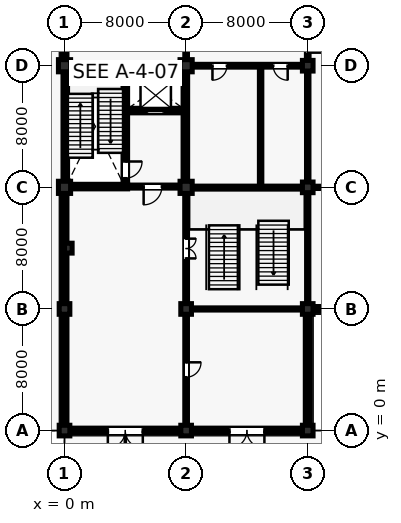
"""IFC4 building model, lengths in metres.
Left out: names, types, materials, properties, quantities, classifications, styles, units other than length and angle.
Written with IfcOpenShell. Run it as: python <this file> out.ifc"""

import sys

from ifc_helpers import new_model, si_unit, direction, frame, frame_2d, origin, origin_2d, place, context, subcontext, project, spatial, rectangle, extrude, element, fill, save


model = new_model("IFC4")
c1 = context("Model", 3, precision=1e-05, world=origin(), true_north=direction((0.0, 1.0)))
c2 = subcontext(c1, "Body", "Model", "MODEL_VIEW")
j1 = project(units=[si_unit("LENGTHUNIT", "METRE"), si_unit("PLANEANGLEUNIT", "RADIAN")], contexts=[c1])
p1 = place(None, origin())
s1 = spatial("IfcSite", under=j1, at=p1, CompositionType="ELEMENT")
p2 = place(p1, origin())
s2 = spatial("IfcBuilding", under=s1, at=p2, CompositionType="ELEMENT")
p3 = place(p2, origin())
s3 = spatial("IfcBuildingStorey", under=s2, at=p3, CompositionType="ELEMENT", Elevation=0.0)
for number, where, z_axis, x_axis in (
    (1, (0.0, 0.0, 0.0), (0.0, 0.0, 1.0), (1.0, 0.0, 0.0)),
    (2, (0.0, 8.0, 0.0), (0.0, 0.0, 1.0), (1.0, 0.0, 0.0)),
):
    element("IfcColumn", number, at=place(p3, frame(where, z_axis=z_axis, x_axis=x_axis)), inside=s3, PredefinedType="COLUMN", context=c2, shape_type="SweptSolid", body=[
        extrude(rectangle(XDim=0.7, YDim=0.7, at=origin_2d()), origin(), (0.0, 0.0, 1.0), 5.28),
    ])
for number, where, z_axis, x_axis in (
    (3, (0.0, 16.0, 0.0), (0.0, 0.0, 1.0), (1.0, 0.0, 0.0)),
    (4, (0.0, 24.0, 0.0), (0.0, 0.0, 1.0), (1.0, 0.0, 0.0)),
):
    element("IfcColumn", number, at=place(p3, frame(where, z_axis=z_axis, x_axis=x_axis)), inside=s3, PredefinedType="COLUMN", context=c2, shape_type="SweptSolid", body=[
        extrude(rectangle(XDim=0.8, YDim=0.8, at=origin_2d()), origin(), (0.0, 0.0, 1.0), 5.28),
    ])
for number, where, z_axis, x_axis in (
    (5, (8.0, 0.0, 0.0), (0.0, 0.0, 1.0), (1.0, 0.0, 0.0)),
    (6, (8.0, 8.0, 0.0), (0.0, 0.0, 1.0), (1.0, 0.0, 0.0)),
):
    element("IfcColumn", number, at=place(p3, frame(where, z_axis=z_axis, x_axis=x_axis)), inside=s3, PredefinedType="COLUMN", context=c2, shape_type="SweptSolid", body=[
        extrude(rectangle(XDim=0.7, YDim=0.7, at=origin_2d()), origin(), (0.0, 0.0, 1.0), 5.28),
    ])
for number, where, z_axis, x_axis in (
    (7, (8.0, 16.0, 0.0), (0.0, 0.0, 1.0), (1.0, 0.0, 0.0)),
    (8, (8.0, 24.0, 0.0), (0.0, 0.0, 1.0), (1.0, 0.0, 0.0)),
):
    element("IfcColumn", number, at=place(p3, frame(where, z_axis=z_axis, x_axis=x_axis)), inside=s3, PredefinedType="COLUMN", context=c2, shape_type="SweptSolid", body=[
        extrude(rectangle(XDim=0.8, YDim=0.8, at=origin_2d()), origin(), (0.0, 0.0, 1.0), 5.28),
    ])
for number, where, z_axis, x_axis in (
    (9, (16.0, 0.0, 0.0), (0.0, 0.0, 1.0), (1.0, 0.0, 0.0)),
    (10, (16.0, 8.0, 0.0), (0.0, 0.0, 1.0), (1.0, 0.0, 0.0)),
    (11, (16.0, 16.0, 0.0), (0.0, 0.0, 1.0), (1.0, 0.0, 0.0)),
    (12, (16.0, 24.0, 0.0), (0.0, 0.0, 1.0), (1.0, 0.0, 0.0)),
):
    element("IfcColumn", number, at=place(p3, frame(where, z_axis=z_axis, x_axis=x_axis)), inside=s3, PredefinedType="COLUMN", context=c2, shape_type="SweptSolid", body=[
        extrude(rectangle(XDim=0.7, YDim=0.7, at=origin_2d()), origin(), (0.0, 0.0, 1.0), 5.28),
    ])
p4 = place(p3, frame((0.25, 12.0, 0.0), z_axis=(0.0, 0.0, 1.0), x_axis=(1.0, 0.0, 0.0)))
e13 = element("IfcColumn", 13, at=p4, inside=s3, PredefinedType="PILASTER", context=c2, shape_type="SweptSolid", body=[
    extrude(rectangle(XDim=0.5, YDim=0.65, at=origin_2d()), origin(), (0.0, 0.0, 1.0), 5.28),
])
p5 = place(p3, frame((0.335, 0.0, 0.0), z_axis=(0.0, 0.0, 1.0), x_axis=(1.0, 0.0, 0.0)))
e14 = element("IfcWall", 14, at=p5, inside=s3, PredefinedType="SOLIDWALL", context=c2, shape_type="SweptSolid", body=[
    extrude(rectangle(XDim=7.33, YDim=0.32, at=frame_2d((3.665, 0.0))), origin(), (0.0, 0.0, 1.0), 4.61),
])
p6 = place(p5, frame((2.515, 0.0, 0.0)))
e15 = element("IfcOpeningElement", 15, at=p6, cuts=e14, PredefinedType="OPENING", context=c2, shape_type="SweptSolid", body=[
    extrude(rectangle(XDim=2.3, YDim=2.55, at=frame_2d((1.15, 1.275))), frame((0.0, 0.17, 0.0), z_axis=(0.0, -1.0, 0.0), x_axis=(1.0, 0.0, 0.0)), (0.0, 0.0, 1.0), 0.34),
])
p7 = place(p3, frame((0.0, 0.335, 0.0), z_axis=(0.0, 0.0, 1.0), x_axis=(0.0, 1.0, 0.0)))
e16 = element("IfcWall", 16, at=p7, inside=s3, PredefinedType="SOLIDWALL", context=c2, shape_type="SweptSolid", body=[
    extrude(rectangle(XDim=7.33, YDim=0.32, at=frame_2d((3.665, 0.0))), origin(), (0.0, 0.0, 1.0), 4.61),
])
p8 = place(p7, frame((2.465, 0.0, 0.9)))
e17 = element("IfcOpeningElement", 17, at=p8, cuts=e16, PredefinedType="OPENING", context=c2, shape_type="SweptSolid", body=[
    extrude(rectangle(XDim=2.4, YDim=2.8, at=frame_2d((1.2, 1.4))), frame((0.0, 0.17, 0.0), z_axis=(0.0, -1.0, 0.0), x_axis=(1.0, 0.0, 0.0)), (0.0, 0.0, 1.0), 0.34),
])
p9 = place(p3, frame((0.0, 8.335, 0.0), z_axis=(0.0, 0.0, 1.0), x_axis=(0.0, 1.0, 0.0)))
e18 = element("IfcWall", 18, at=p9, inside=s3, PredefinedType="SOLIDWALL", context=c2, shape_type="SweptSolid", body=[
    extrude(rectangle(XDim=7.28, YDim=0.32, at=frame_2d((3.64, 0.0))), origin(), (0.0, 0.0, 1.0), 4.674),
])
p10 = place(p9, frame((4.25, 0.0, 0.9)))
e19 = element("IfcOpeningElement", 19, at=p10, cuts=e18, PredefinedType="OPENING", context=c2, shape_type="SweptSolid", body=[
    extrude(rectangle(XDim=2.15, YDim=2.8, at=frame_2d((1.075, 1.4))), frame((0.0, 0.17, 0.0), z_axis=(0.0, -1.0, 0.0), x_axis=(1.0, 0.0, 0.0)), (0.0, 0.0, 1.0), 0.34),
])
p11 = place(p3, frame((0.0, 24.385, 0.0), z_axis=(0.0, 0.0, 1.0), x_axis=(0.0, 1.0, 0.0)))
e20 = element("IfcWall", 20, at=p11, inside=s3, PredefinedType="SOLIDWALL", context=c2, shape_type="SweptSolid", body=[
    extrude(rectangle(XDim=7.28, YDim=0.32, at=frame_2d((3.64, 0.0))), origin(), (0.0, 0.0, 1.0), 4.677),
])
p12 = place(p11, frame((2.54, 0.0, 0.0)))
e21 = element("IfcOpeningElement", 21, at=p12, cuts=e20, PredefinedType="OPENING", context=c2, shape_type="SweptSolid", body=[
    extrude(rectangle(XDim=2.2, YDim=2.5, at=frame_2d((1.1, 1.25))), frame((0.0, 0.17, 0.0), z_axis=(0.0, -1.0, 0.0), x_axis=(1.0, 0.0, 0.0)), (0.0, 0.0, 1.0), 0.34),
])
p13 = place(p3, frame((8.335, 0.0, 0.0), z_axis=(0.0, 0.0, 1.0), x_axis=(1.0, 0.0, 0.0)))
e22 = element("IfcWall", 22, at=p13, inside=s3, PredefinedType="SOLIDWALL", context=c2, shape_type="SweptSolid", body=[
    extrude(rectangle(XDim=7.33, YDim=0.32, at=frame_2d((3.665, 0.0))), origin(), (0.0, 0.0, 1.0), 4.674),
])
p14 = place(p13, frame((2.515, 0.0, 0.0)))
e23 = element("IfcOpeningElement", 23, at=p14, cuts=e22, PredefinedType="OPENING", context=c2, shape_type="SweptSolid", body=[
    extrude(rectangle(XDim=2.3, YDim=2.55, at=frame_2d((1.15, 1.275))), frame((0.0, 0.17, 0.0), z_axis=(0.0, -1.0, 0.0), x_axis=(1.0, 0.0, 0.0)), (0.0, 0.0, 1.0), 0.34),
])
p15 = place(p3, frame((16.0, 0.335, 0.0), z_axis=(0.0, 0.0, 1.0), x_axis=(0.0, 1.0, 0.0)))
e24 = element("IfcWall", 24, at=p15, inside=s3, PredefinedType="SOLIDWALL", context=c2, shape_type="SweptSolid", body=[
    extrude(rectangle(XDim=7.33, YDim=0.32, at=frame_2d((3.665, 0.0))), origin(), (0.0, 0.0, 1.0), 4.614),
])
p16 = place(p15, frame((2.59, 0.0, 0.9)))
e25 = element("IfcOpeningElement", 25, at=p16, cuts=e24, PredefinedType="OPENING", context=c2, shape_type="SweptSolid", body=[
    extrude(rectangle(XDim=2.15, YDim=2.8, at=frame_2d((1.075, 1.4))), frame((0.0, 0.17, 0.0), z_axis=(0.0, -1.0, 0.0), x_axis=(1.0, 0.0, 0.0)), (0.0, 0.0, 1.0), 0.34),
])
p17 = place(p3, frame((16.335, 8.0, 0.0), z_axis=(0.0, 0.0, 1.0), x_axis=(1.0, 0.0, 0.0)))
e26 = element("IfcWall", 26, at=p17, inside=s3, PredefinedType="SOLIDWALL", context=c2, shape_type="SweptSolid", body=[
    extrude(rectangle(XDim=7.33, YDim=0.32, at=frame_2d((3.665, 0.0))), origin(), (0.0, 0.0, 1.0), 4.677),
])
p18 = place(p17, frame((2.515, 0.0, 0.9)))
e27 = element("IfcOpeningElement", 27, at=p18, cuts=e26, PredefinedType="OPENING", context=c2, shape_type="SweptSolid", body=[
    extrude(rectangle(XDim=2.3, YDim=2.55, at=frame_2d((1.15, 1.275))), frame((0.0, 0.17, 0.0), z_axis=(0.0, -1.0, 0.0), x_axis=(1.0, 0.0, 0.0)), (0.0, 0.0, 1.0), 0.34),
])
for number, where, z_axis, x_axis in (
    (28, (0.05, 16.29, 0.0), (0.0, 0.0, 1.0), (0.0, 1.0, 0.0)),
    (29, (0.29, 23.95, 0.0), (0.0, 0.0, 1.0), (1.0, 0.0, 0.0)),
    (30, (7.95, 16.29, 0.0), (0.0, 0.0, 1.0), (0.0, 1.0, 0.0)),
):
    element("IfcWall", number, at=place(p3, frame(where, z_axis=z_axis, x_axis=x_axis)), inside=s3, PredefinedType="SHEAR", context=c2, shape_type="SweptSolid", body=[
        extrude(rectangle(XDim=7.42, YDim=0.3, at=frame_2d((3.71, 0.0))), origin(), (0.0, 0.0, 1.0), 5.035),
    ])
p19 = place(p3, frame((0.29, 16.05, 0.0), z_axis=(0.0, 0.0, 1.0), x_axis=(1.0, 0.0, 0.0)))
e31 = element("IfcWall", 31, at=p19, inside=s3, PredefinedType="SHEAR", context=c2, shape_type="SweptSolid", body=[
    extrude(rectangle(XDim=3.86, YDim=0.3, at=frame_2d((1.93, 0.0))), origin(), (0.0, 0.0, 1.0), 5.035),
])
p20 = place(p3, frame((4.0, 16.05, 0.0), z_axis=(0.0, 0.0, 1.0), x_axis=(0.0, 1.0, 0.0)))
e32 = element("IfcWall", 32, at=p20, inside=s3, PredefinedType="SHEAR", context=c2, shape_type="SweptSolid", body=[
    extrude(rectangle(XDim=7.9, YDim=0.3, at=frame_2d((3.95, 0.0))), origin(), (0.0, 0.0, 1.0), 5.035),
])
p21 = place(p20, frame((0.55, 0.0, 0.0)))
e33 = element("IfcOpeningElement", 33, at=p21, cuts=e32, PredefinedType="OPENING", context=c2, shape_type="SweptSolid", body=[
    extrude(rectangle(XDim=1.1, YDim=2.15, at=frame_2d((0.55, 1.075))), frame((0.0, 0.16, 0.0), z_axis=(0.0, -1.0, 0.0), x_axis=(1.0, 0.0, 0.0)), (0.0, 0.0, 1.0), 0.32),
])
p22 = place(p3, frame((4.0, 21.05, 0.0), z_axis=(0.0, 0.0, 1.0), x_axis=(1.0, 0.0, 0.0)))
e34 = element("IfcWall", 34, at=p22, inside=s3, PredefinedType="SHEAR", context=c2, shape_type="SweptSolid", body=[
    extrude(rectangle(XDim=3.95, YDim=0.3, at=frame_2d((1.975, 0.0))), origin(), (0.0, 0.0, 1.0), 5.035),
])
p23 = place(p22, frame((1.425, 0.0, 0.0)))
e35 = element("IfcOpeningElement", 35, at=p23, cuts=e34, PredefinedType="OPENING", context=c2, shape_type="SweptSolid", body=[
    extrude(rectangle(XDim=1.1, YDim=2.2, at=frame_2d((0.55, 1.1))), frame((0.0, 0.16, 0.0), z_axis=(0.0, -1.0, 0.0), x_axis=(1.0, 0.0, 0.0)), (0.0, 0.0, 1.0), 0.32),
])
p24 = place(p3, frame((4.0, 16.05, 0.0), z_axis=(0.0, 0.0, 1.0), x_axis=(1.0, 0.0, 0.0)))
e36 = element("IfcWall", 36, at=p24, inside=s3, PredefinedType="PARTITIONING", context=c2, shape_type="SweptSolid", body=[
    extrude(rectangle(XDim=3.61, YDim=0.2, at=frame_2d((1.805, 0.0))), origin(), (0.0, 0.0, 1.0), 4.336),
])
p25 = place(p24, frame((1.205, 0.0, 0.0)))
e37 = element("IfcOpeningElement", 37, at=p25, cuts=e36, PredefinedType="OPENING", context=c2, shape_type="SweptSolid", body=[
    extrude(rectangle(XDim=1.2, YDim=2.15, at=frame_2d((0.6, 1.075))), frame((0.0, 0.11, 0.0), z_axis=(0.0, -1.0, 0.0), x_axis=(1.0, 0.0, 0.0)), (0.0, 0.0, 1.0), 0.22),
])
p26 = place(p3, frame((8.0, 0.34, 0.0), z_axis=(0.0, 0.0, 1.0), x_axis=(0.0, 1.0, 0.0)))
e38 = element("IfcWall", 38, at=p26, inside=s3, PredefinedType="PARTITIONING", context=c2, shape_type="SweptSolid", body=[
    extrude(rectangle(XDim=7.32, YDim=0.175, at=frame_2d((3.66, 0.0))), origin(), (0.0, 0.0, 1.0), 4.412),
])
p27 = place(p26, frame((3.17, 0.0, 0.0)))
e39 = element("IfcOpeningElement", 39, at=p27, cuts=e38, PredefinedType="OPENING", context=c2, shape_type="SweptSolid", body=[
    extrude(rectangle(XDim=0.98, YDim=2.15, at=frame_2d((0.49, 1.075))), frame((0.0, 0.097, 0.0), z_axis=(0.0, -1.0, 0.0), x_axis=(1.0, 0.0, 0.0)), (0.0, 0.0, 1.0), 0.195),
])
p28 = place(p3, frame((8.0, 8.34, 0.0), z_axis=(0.0, 0.0, 1.0), x_axis=(0.0, 1.0, 0.0)))
e40 = element("IfcWall", 40, at=p28, inside=s3, PredefinedType="PARTITIONING", context=c2, shape_type="SweptSolid", body=[
    extrude(rectangle(XDim=7.27, YDim=0.185, at=frame_2d((3.635, 0.0))), origin(), (0.0, 0.0, 1.0), 4.404),
])
p29 = place(p28, frame((2.985, 0.0, 0.0)))
e41 = element("IfcOpeningElement", 41, at=p29, cuts=e40, PredefinedType="OPENING", context=c2, shape_type="SweptSolid", body=[
    extrude(rectangle(XDim=1.3, YDim=2.2, at=frame_2d((0.65, 1.1))), frame((0.0, 0.103, 0.0), z_axis=(0.0, -1.0, 0.0), x_axis=(1.0, 0.0, 0.0)), (0.0, 0.0, 1.0), 0.205),
])
p30 = place(p3, frame((8.0, 24.39, 0.0), z_axis=(0.0, 0.0, 1.0), x_axis=(0.0, 1.0, 0.0)))
e42 = element("IfcWall", 42, at=p30, inside=s3, PredefinedType="PARTITIONING", context=c2, shape_type="SweptSolid", body=[
    extrude(rectangle(XDim=7.27, YDim=0.175, at=frame_2d((3.635, 0.0))), origin(), (0.0, 0.0, 1.0), 4.403),
])
p31 = place(p30, frame((3.095, 0.0, 0.0)))
e43 = element("IfcOpeningElement", 43, at=p31, cuts=e42, PredefinedType="OPENING", context=c2, shape_type="SweptSolid", body=[
    extrude(rectangle(XDim=1.08, YDim=2.2, at=frame_2d((0.54, 1.1))), frame((0.0, 0.097, 0.0), z_axis=(0.0, -1.0, 0.0), x_axis=(1.0, 0.0, 0.0)), (0.0, 0.0, 1.0), 0.195),
])
p32 = place(p3, frame((8.34, 8.0, 0.0), z_axis=(0.0, 0.0, 1.0), x_axis=(1.0, 0.0, 0.0)))
e44 = element("IfcWall", 44, at=p32, inside=s3, PredefinedType="PARTITIONING", context=c2, shape_type="SweptSolid", body=[
    extrude(rectangle(XDim=7.32, YDim=0.142, at=frame_2d((3.66, 0.0))), origin(), (0.0, 0.0, 1.0), 4.336),
])
p33 = place(p3, frame((16.0, 8.34, 0.0), z_axis=(0.0, 0.0, 1.0), x_axis=(0.0, 1.0, 0.0)))
e45 = element("IfcWall", 45, at=p33, inside=s3, PredefinedType="PARTITIONING", context=c2, shape_type="SweptSolid", body=[
    extrude(rectangle(XDim=7.32, YDim=0.15, at=frame_2d((3.66, 0.0))), origin(), (0.0, 0.0, 1.0), 4.471),
])
p34 = place(p3, frame((8.39, 16.0, 0.0), z_axis=(0.0, 0.0, 1.0), x_axis=(1.0, 0.0, 0.0)))
e46 = element("IfcWall", 46, at=p34, inside=s3, PredefinedType="PARTITIONING", context=c2, shape_type="SweptSolid", body=[
    extrude(rectangle(XDim=7.27, YDim=0.16, at=frame_2d((3.635, 0.0))), origin(), (0.0, 0.0, 1.0), 4.404),
])
p35 = place(p3, frame((16.0, 16.34, 0.0), z_axis=(0.0, 0.0, 1.0), x_axis=(0.0, 1.0, 0.0)))
e47 = element("IfcWall", 47, at=p35, inside=s3, PredefinedType="PARTITIONING", context=c2, shape_type="SweptSolid", body=[
    extrude(rectangle(XDim=7.32, YDim=0.16, at=frame_2d((3.66, 0.0))), origin(), (0.0, 0.0, 1.0), 4.603),
])
p36 = place(p3, frame((8.39, 24.0, 0.0), z_axis=(0.0, 0.0, 1.0), x_axis=(1.0, 0.0, 0.0)))
e48 = element("IfcWall", 48, at=p36, inside=s3, PredefinedType="PARTITIONING", context=c2, shape_type="SweptSolid", body=[
    extrude(rectangle(XDim=7.27, YDim=0.185, at=frame_2d((3.635, 0.0))), origin(), (0.0, 0.0, 1.0), 4.327),
])
p37 = place(p36, frame((1.343, 0.0, 0.0)))
e49 = element("IfcOpeningElement", 49, at=p37, cuts=e48, PredefinedType="OPENING", context=c2, shape_type="SweptSolid", body=[
    extrude(rectangle(XDim=0.95, YDim=2.1, at=frame_2d((0.475, 1.05))), frame((0.0, 0.103, 0.0), z_axis=(0.0, -1.0, 0.0), x_axis=(1.0, 0.0, 0.0)), (0.0, 0.0, 1.0), 0.205),
])
p38 = place(p36, frame((5.341, 0.0, 0.0)))
e50 = element("IfcOpeningElement", 50, at=p38, cuts=e48, PredefinedType="OPENING", context=c2, shape_type="SweptSolid", body=[
    extrude(rectangle(XDim=0.95, YDim=2.1, at=frame_2d((0.475, 1.05))), frame((0.0, 0.103, 0.0), z_axis=(0.0, -1.0, 0.0), x_axis=(1.0, 0.0, 0.0)), (0.0, 0.0, 1.0), 0.205),
])
p39 = place(p3, frame((16.0, 24.34, 0.0), z_axis=(0.0, 0.0, 1.0), x_axis=(0.0, 1.0, 0.0)))
e51 = element("IfcWall", 51, at=p39, inside=s3, PredefinedType="PARTITIONING", context=c2, shape_type="SweptSolid", body=[
    extrude(rectangle(XDim=7.32, YDim=0.175, at=frame_2d((3.66, 0.0))), origin(), (0.0, 0.0, 1.0), 4.667),
])
p40 = place(p39, frame((0.52, 0.0, 0.0)))
e52 = element("IfcOpeningElement", 52, at=p40, cuts=e51, PredefinedType="OPENING", context=c2, shape_type="SweptSolid", body=[
    extrude(rectangle(XDim=0.94, YDim=2.12, at=frame_2d((0.47, 1.06))), frame((0.0, 0.097, 0.0), z_axis=(0.0, -1.0, 0.0), x_axis=(1.0, 0.0, 0.0)), (0.0, 0.0, 1.0), 0.195),
])
p41 = place(p3, frame((16.34, 16.0, 0.0), z_axis=(0.0, 0.0, 1.0), x_axis=(1.0, 0.0, 0.0)))
e53 = element("IfcWall", 53, at=p41, inside=s3, PredefinedType="PARTITIONING", context=c2, shape_type="SweptSolid", body=[
    extrude(rectangle(XDim=7.32, YDim=0.15, at=frame_2d((3.66, 0.0))), origin(), (0.0, 0.0, 1.0), 4.603),
])
p42 = place(p3, frame((12.9, 16.02, 0.0), z_axis=(0.0, 0.0, 1.0), x_axis=(0.0, 1.0, 0.0)))
e54 = element("IfcWall", 54, at=p42, inside=s3, PredefinedType="PARTITIONING", context=c2, shape_type="SweptSolid", body=[
    extrude(rectangle(XDim=7.96, YDim=0.16, at=frame_2d((3.98, 0.0))), origin(), (0.0, 0.0, 1.0), 4.327),
])
p43 = place(p6, frame((2.3, 0.0, 0.0), z_axis=(0.0, 0.0, 1.0), x_axis=(-1.0, 0.0, 0.0)))
e55 = element("IfcDoor", 55, at=p43, inside=s3, OperationType="DOUBLE_DOOR_SINGLE_SWING", PredefinedType="DOOR", context=c2, shape_type="SweptSolid", body=[
    extrude(rectangle(XDim=2.3, YDim=2.55, at=frame_2d((1.15, 1.275))), frame((0.0, 0.025, 0.0), z_axis=(0.0, -1.0, 0.0), x_axis=(1.0, 0.0, 0.0)), (0.0, 0.0, 1.0), 0.05),
])
fill(e15, e55)
p44 = place(p8, origin())
e56 = element("IfcWindow", 56, at=p44, inside=s3, PartitioningType="SINGLE_PANEL", PredefinedType="WINDOW", context=c2, shape_type="SweptSolid", body=[
    extrude(rectangle(XDim=2.4, YDim=2.8, at=frame_2d((1.2, 1.4))), frame((0.0, 0.03, 0.0), z_axis=(0.0, -1.0, 0.0), x_axis=(1.0, 0.0, 0.0)), (0.0, 0.0, 1.0), 0.06),
])
fill(e17, e56)
p45 = place(p10, origin())
e57 = element("IfcWindow", 57, at=p45, inside=s3, PartitioningType="SINGLE_PANEL", PredefinedType="WINDOW", context=c2, shape_type="SweptSolid", body=[
    extrude(rectangle(XDim=2.15, YDim=2.8, at=frame_2d((1.075, 1.4))), frame((0.0, 0.03, 0.0), z_axis=(0.0, -1.0, 0.0), x_axis=(1.0, 0.0, 0.0)), (0.0, 0.0, 1.0), 0.06),
])
fill(e19, e57)
p46 = place(p14, frame((2.3, 0.0, 0.0), z_axis=(0.0, 0.0, 1.0), x_axis=(-1.0, 0.0, 0.0)))
e58 = element("IfcDoor", 58, at=p46, inside=s3, OperationType="DOUBLE_DOOR_SINGLE_SWING", PredefinedType="DOOR", context=c2, shape_type="SweptSolid", body=[
    extrude(rectangle(XDim=2.3, YDim=2.55, at=frame_2d((1.15, 1.275))), frame((0.0, 0.025, 0.0), z_axis=(0.0, -1.0, 0.0), x_axis=(1.0, 0.0, 0.0)), (0.0, 0.0, 1.0), 0.05),
])
fill(e23, e58)
p47 = place(p16, origin())
e59 = element("IfcWindow", 59, at=p47, inside=s3, PartitioningType="SINGLE_PANEL", PredefinedType="WINDOW", context=c2, shape_type="SweptSolid", body=[
    extrude(rectangle(XDim=2.15, YDim=2.8, at=frame_2d((1.075, 1.4))), frame((0.0, 0.03, 0.0), z_axis=(0.0, -1.0, 0.0), x_axis=(1.0, 0.0, 0.0)), (0.0, 0.0, 1.0), 0.06),
])
fill(e25, e59)
p48 = place(p21, frame((1.1, 0.0, 0.0), z_axis=(0.0, 0.0, 1.0), x_axis=(-1.0, 0.0, 0.0)))
e60 = element("IfcDoor", 60, at=p48, inside=s3, OperationType="SINGLE_SWING_RIGHT", PredefinedType="DOOR", context=c2, shape_type="SweptSolid", body=[
    extrude(rectangle(XDim=1.1, YDim=2.15, at=frame_2d((0.55, 1.075))), frame((0.0, 0.025, 0.0), z_axis=(0.0, -1.0, 0.0), x_axis=(1.0, 0.0, 0.0)), (0.0, 0.0, 1.0), 0.05),
])
fill(e33, e60)
p49 = place(p23, origin())
e61 = element("IfcDoor", 61, at=p49, inside=s3, OperationType="SLIDING_TO_LEFT", PredefinedType="DOOR", context=c2, shape_type="SweptSolid", body=[
    extrude(rectangle(XDim=1.1, YDim=2.2, at=frame_2d((0.55, 1.1))), frame((0.0, 0.025, 0.0), z_axis=(0.0, -1.0, 0.0), x_axis=(1.0, 0.0, 0.0)), (0.0, 0.0, 1.0), 0.05),
])
fill(e35, e61)
p50 = place(p25, frame((1.2, 0.0, 0.0), z_axis=(0.0, 0.0, 1.0), x_axis=(-1.0, 0.0, 0.0)))
e62 = element("IfcDoor", 62, at=p50, inside=s3, OperationType="SINGLE_SWING_LEFT", PredefinedType="DOOR", context=c2, shape_type="SweptSolid", body=[
    extrude(rectangle(XDim=1.2, YDim=2.15, at=frame_2d((0.6, 1.075))), frame((0.0, 0.025, 0.0), z_axis=(0.0, -1.0, 0.0), x_axis=(1.0, 0.0, 0.0)), (0.0, 0.0, 1.0), 0.05),
])
fill(e37, e62)
p51 = place(p27, frame((0.98, 0.0, 0.0), z_axis=(0.0, 0.0, 1.0), x_axis=(-1.0, 0.0, 0.0)))
e63 = element("IfcDoor", 63, at=p51, inside=s3, OperationType="SINGLE_SWING_RIGHT", PredefinedType="DOOR", context=c2, shape_type="SweptSolid", body=[
    extrude(rectangle(XDim=0.98, YDim=2.15, at=frame_2d((0.49, 1.075))), frame((0.0, 0.025, 0.0), z_axis=(0.0, -1.0, 0.0), x_axis=(1.0, 0.0, 0.0)), (0.0, 0.0, 1.0), 0.05),
])
fill(e39, e63)
p52 = place(p29, frame((1.3, 0.0, 0.0), z_axis=(0.0, 0.0, 1.0), x_axis=(-1.0, 0.0, 0.0)))
e64 = element("IfcDoor", 64, at=p52, inside=s3, OperationType="DOUBLE_DOOR_SINGLE_SWING", PredefinedType="DOOR", context=c2, shape_type="SweptSolid", body=[
    extrude(rectangle(XDim=1.3, YDim=2.2, at=frame_2d((0.65, 1.1))), frame((0.0, 0.025, 0.0), z_axis=(0.0, -1.0, 0.0), x_axis=(1.0, 0.0, 0.0)), (0.0, 0.0, 1.0), 0.05),
])
fill(e41, e64)
p53 = place(p37, frame((0.95, 0.0, 0.0), z_axis=(0.0, 0.0, 1.0), x_axis=(-1.0, 0.0, 0.0)))
e65 = element("IfcDoor", 65, at=p53, inside=s3, OperationType="SINGLE_SWING_LEFT", PredefinedType="DOOR", context=c2, shape_type="SweptSolid", body=[
    extrude(rectangle(XDim=0.95, YDim=2.1, at=frame_2d((0.475, 1.05))), frame((0.0, 0.025, 0.0), z_axis=(0.0, -1.0, 0.0), x_axis=(1.0, 0.0, 0.0)), (0.0, 0.0, 1.0), 0.05),
])
fill(e49, e65)
p54 = place(p38, frame((0.95, 0.0, 0.0), z_axis=(0.0, 0.0, 1.0), x_axis=(-1.0, 0.0, 0.0)))
e66 = element("IfcDoor", 66, at=p54, inside=s3, OperationType="SINGLE_SWING_RIGHT", PredefinedType="DOOR", context=c2, shape_type="SweptSolid", body=[
    extrude(rectangle(XDim=0.95, YDim=2.1, at=frame_2d((0.475, 1.05))), frame((0.0, 0.025, 0.0), z_axis=(0.0, -1.0, 0.0), x_axis=(1.0, 0.0, 0.0)), (0.0, 0.0, 1.0), 0.05),
])
fill(e50, e66)
p55 = place(p40, frame((0.94, 0.0, 0.0), z_axis=(0.0, 0.0, 1.0), x_axis=(-1.0, 0.0, 0.0)))
e67 = element("IfcDoor", 67, at=p55, inside=s3, OperationType="SINGLE_SWING_LEFT", PredefinedType="DOOR", context=c2, shape_type="SweptSolid", body=[
    extrude(rectangle(XDim=0.94, YDim=2.12, at=frame_2d((0.47, 1.06))), frame((0.0, 0.025, 0.0), z_axis=(0.0, -1.0, 0.0), x_axis=(1.0, 0.0, 0.0)), (0.0, 0.0, 1.0), 0.05),
])
fill(e52, e67)
save(model, sys.argv[1])
